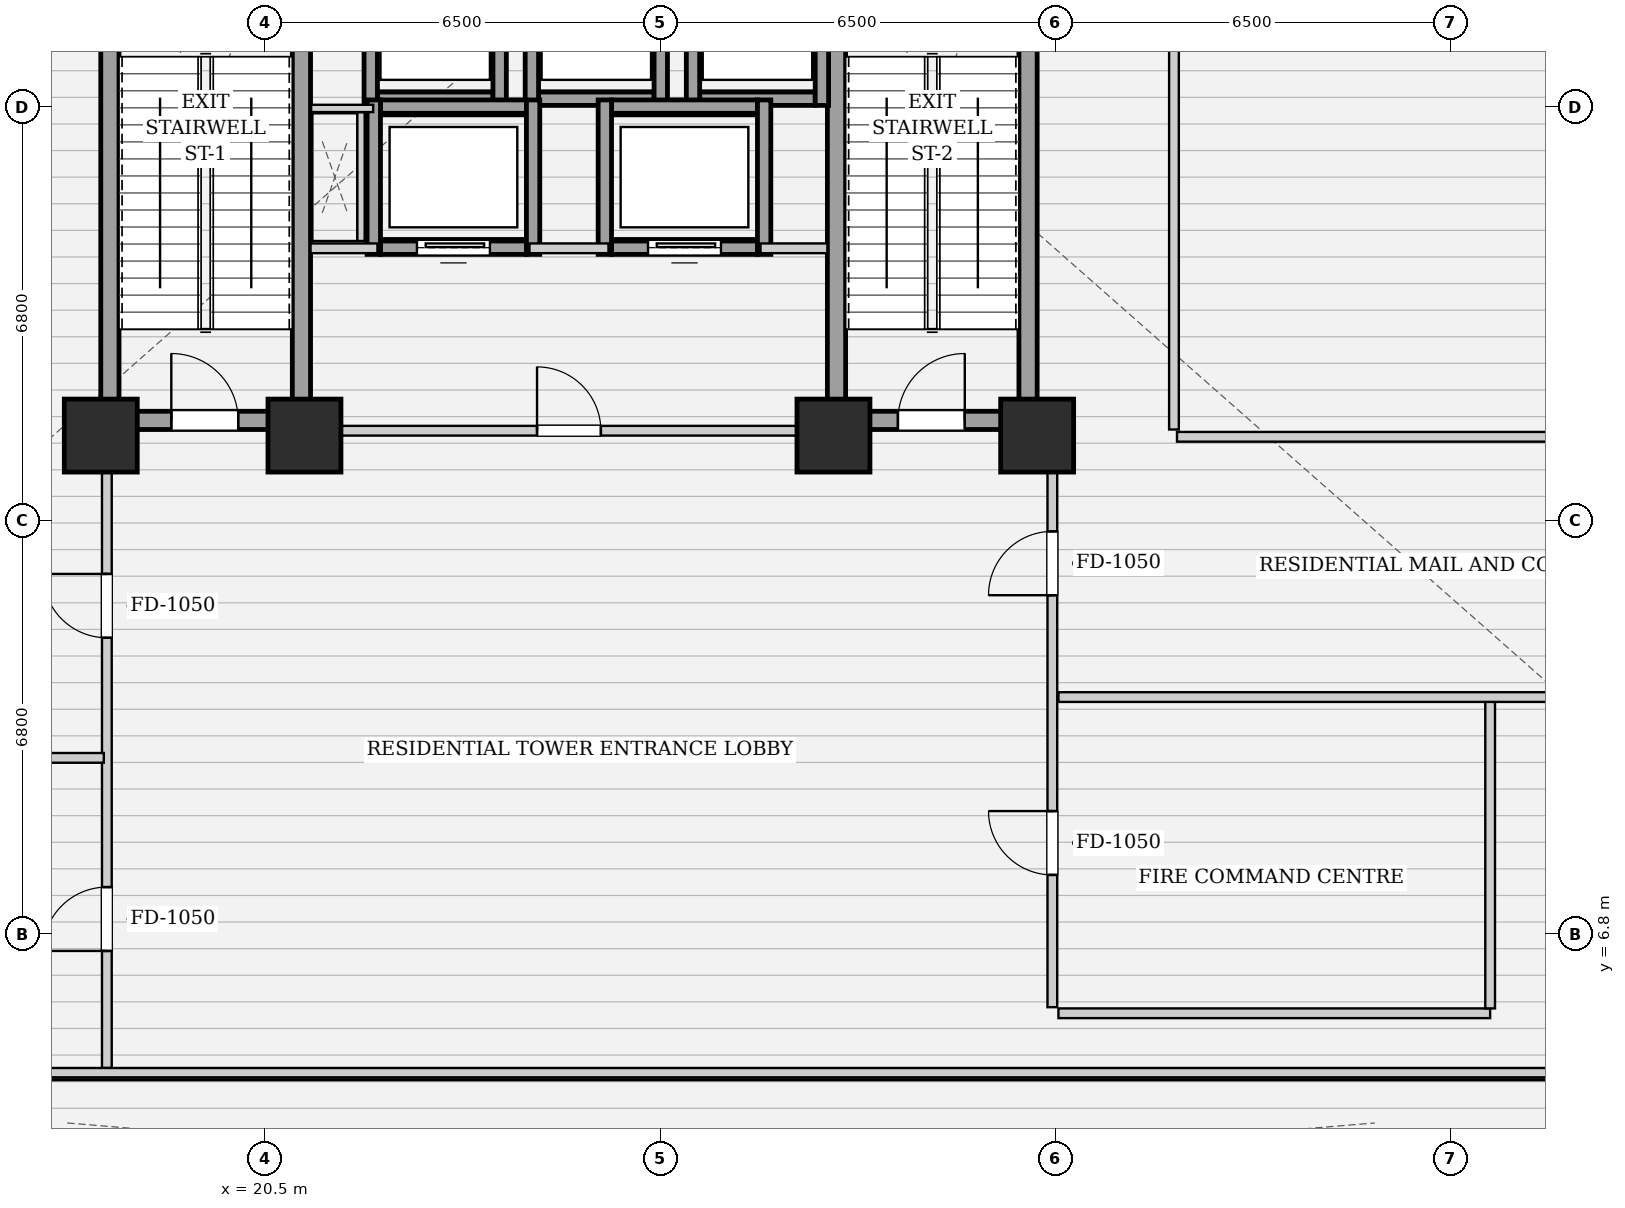
"""IFC4 building model, lengths in metres.
Left out: names, types, materials, properties, quantities, classifications, styles, units other than length and angle.
Written with IfcOpenShell. Run it as: python <this file> out.ifc"""

import sys

from ifc_helpers import new_model, si_unit, direction, frame, frame_2d, origin, origin_2d, place, context, subcontext, project, spatial, rectangle, extrude, element, fill, save


model = new_model("IFC4")
c1 = context("Model", 3, precision=1e-05, world=origin(), true_north=direction((0.0, 1.0)))
c2 = subcontext(c1, "Body", "Model", "MODEL_VIEW")
j1 = project(units=[si_unit("LENGTHUNIT", "METRE"), si_unit("PLANEANGLEUNIT", "RADIAN")], contexts=[c1])
p1 = place(None, origin())
s1 = spatial("IfcSite", under=j1, at=p1, CompositionType="ELEMENT")
p2 = place(p1, origin())
s2 = spatial("IfcBuilding", under=s1, at=p2, CompositionType="ELEMENT")
p3 = place(p2, origin())
s3 = spatial("IfcBuildingStorey", under=s2, at=p3, CompositionType="ELEMENT", Elevation=0.0)
for number, where, z_axis, x_axis in (
    (1, (17.8, 15.0, 0.0), (0.0, 0.0, 1.0), (1.0, 0.0, 0.0)),
    (2, (21.15, 15.0, 0.0), (0.0, 0.0, 1.0), (1.0, 0.0, 0.0)),
    (3, (29.85, 15.0, 0.0), (0.0, 0.0, 1.0), (1.0, 0.0, 0.0)),
    (4, (33.2, 15.0, 0.0), (0.0, 0.0, 1.0), (1.0, 0.0, 0.0)),
):
    element("IfcColumn", number, at=place(p3, frame(where, z_axis=z_axis, x_axis=x_axis)), inside=s3, PredefinedType="COLUMN", context=c2, shape_type="SweptSolid", body=[
        extrude(rectangle(XDim=1.2, YDim=1.2, at=origin_2d()), origin(), (0.0, 0.0, 1.0), 6.0),
    ])
for number, where, z_axis, x_axis in (
    (5, (17.95, 15.1, 0.0), (0.0, 0.0, 1.0), (0.0, 1.0, 0.0)),
    (6, (21.1, 15.1, 0.0), (0.0, 0.0, 1.0), (0.0, 1.0, 0.0)),
):
    element("IfcWall", number, at=place(p3, frame(where, z_axis=z_axis, x_axis=x_axis)), inside=s3, PredefinedType="SHEAR", context=c2, shape_type="SweptSolid", body=[
        extrude(rectangle(XDim=9.0, YDim=0.3, at=frame_2d((4.5, 0.0))), origin(), (0.0, 0.0, 1.0), 5.68),
    ])
p4 = place(p3, frame((18.1, 15.25, 0.0), z_axis=(0.0, 0.0, 1.0), x_axis=(1.0, 0.0, 0.0)))
e7 = element("IfcWall", 7, at=p4, inside=s3, PredefinedType="SHEAR", context=c2, shape_type="SweptSolid", body=[
    extrude(rectangle(XDim=2.85, YDim=0.3, at=frame_2d((1.425, 0.0))), origin(), (0.0, 0.0, 1.0), 5.68),
])
p5 = place(p4, frame((0.86, 0.0, 0.0)))
e8 = element("IfcOpeningElement", 8, at=p5, cuts=e7, PredefinedType="OPENING", context=c2, shape_type="SweptSolid", body=[
    extrude(rectangle(XDim=1.1, YDim=2.05, at=frame_2d((0.55, 1.025))), frame((0.0, 0.16, 0.0), z_axis=(0.0, -1.0, 0.0), x_axis=(1.0, 0.0, 0.0)), (0.0, 0.0, 1.0), 0.32),
])
for number, where, z_axis, x_axis in (
    (9, (29.9, 15.1, 0.0), (0.0, 0.0, 1.0), (0.0, 1.0, 0.0)),
    (10, (33.05, 15.1, 0.0), (0.0, 0.0, 1.0), (0.0, 1.0, 0.0)),
):
    element("IfcWall", number, at=place(p3, frame(where, z_axis=z_axis, x_axis=x_axis)), inside=s3, PredefinedType="SHEAR", context=c2, shape_type="SweptSolid", body=[
        extrude(rectangle(XDim=9.0, YDim=0.3, at=frame_2d((4.5, 0.0))), origin(), (0.0, 0.0, 1.0), 5.68),
    ])
p6 = place(p3, frame((30.05, 15.25, 0.0), z_axis=(0.0, 0.0, 1.0), x_axis=(1.0, 0.0, 0.0)))
e11 = element("IfcWall", 11, at=p6, inside=s3, PredefinedType="SHEAR", context=c2, shape_type="SweptSolid", body=[
    extrude(rectangle(XDim=2.85, YDim=0.3, at=frame_2d((1.425, 0.0))), origin(), (0.0, 0.0, 1.0), 5.68),
])
p7 = place(p6, frame((0.86, 0.0, 0.0)))
e12 = element("IfcOpeningElement", 12, at=p7, cuts=e11, PredefinedType="OPENING", context=c2, shape_type="SweptSolid", body=[
    extrude(rectangle(XDim=1.1, YDim=2.05, at=frame_2d((0.55, 1.025))), frame((0.0, 0.16, 0.0), z_axis=(0.0, -1.0, 0.0), x_axis=(1.0, 0.0, 0.0)), (0.0, 0.0, 1.0), 0.32),
])
p8 = place(p3, frame((22.35, 20.54, 0.0), z_axis=(0.0, 0.0, 1.0), x_axis=(1.0, 0.0, 0.0)))
e13 = element("IfcWall", 13, at=p8, inside=s3, PredefinedType="SHEAR", context=c2, shape_type="SweptSolid", body=[
    extrude(rectangle(XDim=1.9, YDim=0.22, at=frame_2d((0.95, 0.0))), origin(), (0.0, 0.0, 1.0), 5.68),
])
for number, where, z_axis, x_axis in (
    (14, (22.24, 20.43, 0.0), (0.0, 0.0, 1.0), (0.0, 1.0, 0.0)),
    (15, (24.36, 20.43, 0.0), (0.0, 0.0, 1.0), (0.0, 1.0, 0.0)),
):
    element("IfcWall", number, at=place(p3, frame(where, z_axis=z_axis, x_axis=x_axis)), inside=s3, PredefinedType="SHEAR", context=c2, shape_type="SweptSolid", body=[
        extrude(rectangle(XDim=2.44, YDim=0.22, at=frame_2d((1.22, 0.0))), origin(), (0.0, 0.0, 1.0), 5.68),
    ])
p9 = place(p3, frame((25.0, 20.54, 0.0), z_axis=(0.0, 0.0, 1.0), x_axis=(1.0, 0.0, 0.0)))
e16 = element("IfcWall", 16, at=p9, inside=s3, PredefinedType="SHEAR", context=c2, shape_type="SweptSolid", body=[
    extrude(rectangle(XDim=1.9, YDim=0.22, at=frame_2d((0.95, 0.0))), origin(), (0.0, 0.0, 1.0), 5.68),
])
for number, where, z_axis, x_axis in (
    (17, (24.89, 20.43, 0.0), (0.0, 0.0, 1.0), (0.0, 1.0, 0.0)),
    (18, (27.01, 20.43, 0.0), (0.0, 0.0, 1.0), (0.0, 1.0, 0.0)),
):
    element("IfcWall", number, at=place(p3, frame(where, z_axis=z_axis, x_axis=x_axis)), inside=s3, PredefinedType="SHEAR", context=c2, shape_type="SweptSolid", body=[
        extrude(rectangle(XDim=2.44, YDim=0.22, at=frame_2d((1.22, 0.0))), origin(), (0.0, 0.0, 1.0), 5.68),
    ])
p10 = place(p3, frame((27.65, 20.54, 0.0), z_axis=(0.0, 0.0, 1.0), x_axis=(1.0, 0.0, 0.0)))
e19 = element("IfcWall", 19, at=p10, inside=s3, PredefinedType="SHEAR", context=c2, shape_type="SweptSolid", body=[
    extrude(rectangle(XDim=1.9, YDim=0.22, at=frame_2d((0.95, 0.0))), origin(), (0.0, 0.0, 1.0), 5.68),
])
for number, where, z_axis, x_axis in (
    (20, (27.54, 20.43, 0.0), (0.0, 0.0, 1.0), (0.0, 1.0, 0.0)),
    (21, (29.66, 20.43, 0.0), (0.0, 0.0, 1.0), (0.0, 1.0, 0.0)),
):
    element("IfcWall", number, at=place(p3, frame(where, z_axis=z_axis, x_axis=x_axis)), inside=s3, PredefinedType="SHEAR", context=c2, shape_type="SweptSolid", body=[
        extrude(rectangle(XDim=2.44, YDim=0.22, at=frame_2d((1.22, 0.0))), origin(), (0.0, 0.0, 1.0), 5.68),
    ])
p11 = place(p3, frame((22.4, 18.09, 0.0), z_axis=(0.0, 0.0, 1.0), x_axis=(1.0, 0.0, 0.0)))
e22 = element("IfcWall", 22, at=p11, inside=s3, PredefinedType="SHEAR", context=c2, shape_type="SweptSolid", body=[
    extrude(rectangle(XDim=2.4, YDim=0.22, at=frame_2d((1.2, 0.0))), origin(), (0.0, 0.0, 1.0), 5.68),
])
p12 = place(p11, frame((0.6, 0.0, 0.0)))
e23 = element("IfcOpeningElement", 23, at=p12, cuts=e22, PredefinedType="OPENING", context=c2, shape_type="SweptSolid", body=[
    extrude(rectangle(XDim=1.2, YDim=2.15, at=frame_2d((0.6, 1.075))), frame((0.0, 0.12, 0.0), z_axis=(0.0, -1.0, 0.0), x_axis=(1.0, 0.0, 0.0)), (0.0, 0.0, 1.0), 0.24),
])
p13 = place(p3, frame((22.4, 20.41, 0.0), z_axis=(0.0, 0.0, 1.0), x_axis=(1.0, 0.0, 0.0)))
e24 = element("IfcWall", 24, at=p13, inside=s3, PredefinedType="SHEAR", context=c2, shape_type="SweptSolid", body=[
    extrude(rectangle(XDim=2.4, YDim=0.22, at=frame_2d((1.2, 0.0))), origin(), (0.0, 0.0, 1.0), 5.68),
])
for number, where, z_axis, x_axis in (
    (25, (22.29, 17.98, 0.0), (0.0, 0.0, 1.0), (0.0, 1.0, 0.0)),
    (26, (24.91, 17.98, 0.0), (0.0, 0.0, 1.0), (0.0, 1.0, 0.0)),
):
    element("IfcWall", number, at=place(p3, frame(where, z_axis=z_axis, x_axis=x_axis)), inside=s3, PredefinedType="SHEAR", context=c2, shape_type="SweptSolid", body=[
        extrude(rectangle(XDim=2.54, YDim=0.22, at=frame_2d((1.27, 0.0))), origin(), (0.0, 0.0, 1.0), 5.68),
    ])
p14 = place(p3, frame((26.2, 18.09, 0.0), z_axis=(0.0, 0.0, 1.0), x_axis=(1.0, 0.0, 0.0)))
e27 = element("IfcWall", 27, at=p14, inside=s3, PredefinedType="SHEAR", context=c2, shape_type="SweptSolid", body=[
    extrude(rectangle(XDim=2.4, YDim=0.22, at=frame_2d((1.2, 0.0))), origin(), (0.0, 0.0, 1.0), 5.68),
])
p15 = place(p14, frame((0.6, 0.0, 0.0)))
e28 = element("IfcOpeningElement", 28, at=p15, cuts=e27, PredefinedType="OPENING", context=c2, shape_type="SweptSolid", body=[
    extrude(rectangle(XDim=1.2, YDim=2.15, at=frame_2d((0.6, 1.075))), frame((0.0, 0.12, 0.0), z_axis=(0.0, -1.0, 0.0), x_axis=(1.0, 0.0, 0.0)), (0.0, 0.0, 1.0), 0.24),
])
p16 = place(p3, frame((26.2, 20.41, 0.0), z_axis=(0.0, 0.0, 1.0), x_axis=(1.0, 0.0, 0.0)))
e29 = element("IfcWall", 29, at=p16, inside=s3, PredefinedType="SHEAR", context=c2, shape_type="SweptSolid", body=[
    extrude(rectangle(XDim=2.4, YDim=0.22, at=frame_2d((1.2, 0.0))), origin(), (0.0, 0.0, 1.0), 5.68),
])
for number, where, z_axis, x_axis in (
    (30, (26.09, 17.98, 0.0), (0.0, 0.0, 1.0), (0.0, 1.0, 0.0)),
    (31, (28.71, 17.98, 0.0), (0.0, 0.0, 1.0), (0.0, 1.0, 0.0)),
):
    element("IfcWall", number, at=place(p3, frame(where, z_axis=z_axis, x_axis=x_axis)), inside=s3, PredefinedType="SHEAR", context=c2, shape_type="SweptSolid", body=[
        extrude(rectangle(XDim=2.54, YDim=0.22, at=frame_2d((1.27, 0.0))), origin(), (0.0, 0.0, 1.0), 5.68),
    ])
p17 = place(p3, frame((21.25, 15.08, 0.0), z_axis=(0.0, 0.0, 1.0), x_axis=(1.0, 0.0, 0.0)))
e32 = element("IfcWall", 32, at=p17, inside=s3, PredefinedType="PARTITIONING", context=c2, shape_type="SweptSolid", body=[
    extrude(rectangle(XDim=8.5, YDim=0.16, at=frame_2d((4.25, 0.0))), origin(), (0.0, 0.0, 1.0), 5.68),
])
p18 = place(p17, frame((3.725, 0.0, 0.0)))
e33 = element("IfcOpeningElement", 33, at=p18, cuts=e32, PredefinedType="OPENING", context=c2, shape_type="SweptSolid", body=[
    extrude(rectangle(XDim=1.05, YDim=2.05, at=frame_2d((0.525, 1.025))), frame((0.0, 0.09, 0.0), z_axis=(0.0, -1.0, 0.0), x_axis=(1.0, 0.0, 0.0)), (0.0, 0.0, 1.0), 0.18),
])
p19 = place(p3, frame((21.25, 18.08, 0.0), z_axis=(0.0, 0.0, 1.0), x_axis=(1.0, 0.0, 0.0)))
e34 = element("IfcWall", 34, at=p19, inside=s3, PredefinedType="PARTITIONING", context=c2, shape_type="SweptSolid", body=[
    extrude(rectangle(XDim=1.1, YDim=0.16, at=frame_2d((0.55, 0.0))), origin(), (0.0, 0.0, 1.0), 5.68),
])
p20 = place(p3, frame((24.85, 18.08, 0.0), z_axis=(0.0, 0.0, 1.0), x_axis=(1.0, 0.0, 0.0)))
e35 = element("IfcWall", 35, at=p20, inside=s3, PredefinedType="PARTITIONING", context=c2, shape_type="SweptSolid", body=[
    extrude(rectangle(XDim=1.3, YDim=0.16, at=frame_2d((0.65, 0.0))), origin(), (0.0, 0.0, 1.0), 5.68),
])
p21 = place(p3, frame((28.65, 18.08, 0.0), z_axis=(0.0, 0.0, 1.0), x_axis=(1.0, 0.0, 0.0)))
e36 = element("IfcWall", 36, at=p21, inside=s3, PredefinedType="PARTITIONING", context=c2, shape_type="SweptSolid", body=[
    extrude(rectangle(XDim=1.1, YDim=0.16, at=frame_2d((0.55, 0.0))), origin(), (0.0, 0.0, 1.0), 5.68),
])
p22 = place(p3, frame((22.08, 18.2, 0.0), z_axis=(0.0, 0.0, 1.0), x_axis=(0.0, 1.0, 0.0)))
e37 = element("IfcWall", 37, at=p22, inside=s3, PredefinedType="PARTITIONING", context=c2, shape_type="SweptSolid", body=[
    extrude(rectangle(XDim=2.12, YDim=0.12, at=frame_2d((1.06, 0.0))), origin(), (0.0, 0.0, 1.0), 5.68),
])
p23 = place(p3, frame((22.28, 20.38, 0.0), z_axis=(0.0, 0.0, 1.0), x_axis=(-1.0, 0.0, 0.0)))
e38 = element("IfcWall", 38, at=p23, inside=s3, PredefinedType="PARTITIONING", context=c2, shape_type="SweptSolid", body=[
    extrude(rectangle(XDim=1.02, YDim=0.12, at=frame_2d((0.51, 0.0))), origin(), (0.0, 0.0, 1.0), 5.68),
])
p24 = place(p3, frame((17.9, 4.6, 0.0), z_axis=(0.0, 0.0, 1.0), x_axis=(0.0, 1.0, 0.0)))
e39 = element("IfcWall", 39, at=p24, inside=s3, PredefinedType="PARTITIONING", context=c2, shape_type="SweptSolid", body=[
    extrude(rectangle(XDim=10.38, YDim=0.16, at=frame_2d((5.19, 0.0))), origin(), (0.0, 0.0, 1.0), 4.565),
])
p25 = place(p24, frame((1.925, 0.0, 0.0)))
e40 = element("IfcOpeningElement", 40, at=p25, cuts=e39, PredefinedType="OPENING", context=c2, shape_type="SweptSolid", body=[
    extrude(rectangle(XDim=1.05, YDim=2.05, at=frame_2d((0.525, 1.025))), frame((0.0, 0.09, 0.0), z_axis=(0.0, -1.0, 0.0), x_axis=(1.0, 0.0, 0.0)), (0.0, 0.0, 1.0), 0.18),
])
p26 = place(p24, frame((7.075, 0.0, 0.0)))
e41 = element("IfcOpeningElement", 41, at=p26, cuts=e39, PredefinedType="OPENING", context=c2, shape_type="SweptSolid", body=[
    extrude(rectangle(XDim=1.05, YDim=2.05, at=frame_2d((0.525, 1.025))), frame((0.0, 0.09, 0.0), z_axis=(0.0, -1.0, 0.0), x_axis=(1.0, 0.0, 0.0)), (0.0, 0.0, 1.0), 0.18),
])
p27 = place(p3, frame((33.45, 5.6, 0.0), z_axis=(0.0, 0.0, 1.0), x_axis=(0.0, 1.0, 0.0)))
e42 = element("IfcWall", 42, at=p27, inside=s3, PredefinedType="PARTITIONING", context=c2, shape_type="SweptSolid", body=[
    extrude(rectangle(XDim=9.3, YDim=0.16, at=frame_2d((4.65, 0.0))), origin(), (0.0, 0.0, 1.0), 5.68),
])
p28 = place(p27, frame((2.175, 0.0, 0.0)))
e43 = element("IfcOpeningElement", 43, at=p28, cuts=e42, PredefinedType="OPENING", context=c2, shape_type="SweptSolid", body=[
    extrude(rectangle(XDim=1.05, YDim=2.05, at=frame_2d((0.525, 1.025))), frame((0.0, 0.09, 0.0), z_axis=(0.0, -1.0, 0.0), x_axis=(1.0, 0.0, 0.0)), (0.0, 0.0, 1.0), 0.18),
])
p29 = place(p27, frame((6.775, 0.0, 0.0)))
e44 = element("IfcOpeningElement", 44, at=p29, cuts=e42, PredefinedType="OPENING", context=c2, shape_type="SweptSolid", body=[
    extrude(rectangle(XDim=1.05, YDim=2.05, at=frame_2d((0.525, 1.025))), frame((0.0, 0.09, 0.0), z_axis=(0.0, -1.0, 0.0), x_axis=(1.0, 0.0, 0.0)), (0.0, 0.0, 1.0), 0.18),
])
p30 = place(p3, frame((33.55, 5.5, 0.0), z_axis=(0.0, 0.0, 1.0), x_axis=(1.0, 0.0, 0.0)))
e45 = element("IfcWall", 45, at=p30, inside=s3, PredefinedType="PARTITIONING", context=c2, shape_type="SweptSolid", body=[
    extrude(rectangle(XDim=7.1, YDim=0.16, at=frame_2d((3.55, 0.0))), origin(), (0.0, 0.0, 1.0), 5.68),
])
p31 = place(p3, frame((40.65, 5.58, 0.0), z_axis=(0.0, 0.0, 1.0), x_axis=(0.0, 1.0, 0.0)))
e46 = element("IfcWall", 46, at=p31, inside=s3, PredefinedType="PARTITIONING", context=c2, shape_type="SweptSolid", body=[
    extrude(rectangle(XDim=5.07, YDim=0.16, at=frame_2d((2.535, 0.0))), origin(), (0.0, 0.0, 1.0), 5.68),
])
p32 = place(p3, frame((33.55, 10.7, 0.0), z_axis=(0.0, 0.0, 1.0), x_axis=(1.0, 0.0, 0.0)))
e47 = element("IfcWall", 47, at=p32, inside=s3, PredefinedType="PARTITIONING", context=c2, shape_type="SweptSolid", body=[
    extrude(rectangle(XDim=14.05, YDim=0.16, at=frame_2d((7.025, 0.0))), origin(), (0.0, 0.0, 1.0), 5.68),
])
p33 = place(p3, frame((35.5, 14.98, 0.0), z_axis=(0.0, 0.0, 1.0), x_axis=(1.0, 0.0, 0.0)))
e48 = element("IfcWall", 48, at=p33, inside=s3, PredefinedType="PARTITIONING", context=c2, shape_type="SweptSolid", body=[
    extrude(rectangle(XDim=12.1, YDim=0.16, at=frame_2d((6.05, 0.0))), origin(), (0.0, 0.0, 1.0), 4.565),
])
p34 = place(p3, frame((6.4, 4.52, 0.0), z_axis=(0.0, 0.0, 1.0), x_axis=(1.0, 0.0, 0.0)))
e49 = element("IfcWall", 49, at=p34, inside=s3, PredefinedType="PARTITIONING", context=c2, shape_type="SweptSolid", body=[
    extrude(rectangle(XDim=40.9, YDim=0.16, at=frame_2d((20.45, 0.0))), origin(), (0.0, 0.0, 1.0), 5.68),
])
p35 = place(p3, frame((6.4, 9.7, 0.0), z_axis=(0.0, 0.0, 1.0), x_axis=(1.0, 0.0, 0.0)))
e50 = element("IfcWall", 50, at=p35, inside=s3, PredefinedType="PARTITIONING", context=c2, shape_type="SweptSolid", body=[
    extrude(rectangle(XDim=11.45, YDim=0.16, at=frame_2d((5.725, 0.0))), origin(), (0.0, 0.0, 1.0), 5.68),
])
p36 = place(p3, frame((35.45, 15.1, 0.0), z_axis=(0.0, 0.0, 1.0), x_axis=(0.0, 1.0, 0.0)))
e51 = element("IfcWall", 51, at=p36, inside=s3, PredefinedType="PARTITIONING", context=c2, shape_type="SweptSolid", body=[
    extrude(rectangle(XDim=13.78, YDim=0.16, at=frame_2d((6.89, 0.0))), origin(), (0.0, 0.0, 1.0), 5.68),
])
p37 = place(p36, frame((6.975, 0.0, 0.0)))
e52 = element("IfcOpeningElement", 52, at=p37, cuts=e51, PredefinedType="OPENING", context=c2, shape_type="SweptSolid", body=[
    extrude(rectangle(XDim=1.05, YDim=2.05, at=frame_2d((0.525, 1.025))), frame((0.0, 0.09, 0.0), z_axis=(0.0, -1.0, 0.0), x_axis=(1.0, 0.0, 0.0)), (0.0, 0.0, 1.0), 0.18),
])
p38 = place(p5, origin())
e53 = element("IfcDoor", 53, at=p38, inside=s3, OperationType="SINGLE_SWING_LEFT", PredefinedType="DOOR", context=c2, shape_type="SweptSolid", body=[
    extrude(rectangle(XDim=1.1, YDim=2.05, at=frame_2d((0.55, 1.025))), frame((0.0, 0.025, 0.0), z_axis=(0.0, -1.0, 0.0), x_axis=(1.0, 0.0, 0.0)), (0.0, 0.0, 1.0), 0.05),
])
fill(e8, e53)
p39 = place(p7, origin())
e54 = element("IfcDoor", 54, at=p39, inside=s3, OperationType="SINGLE_SWING_RIGHT", PredefinedType="DOOR", context=c2, shape_type="SweptSolid", body=[
    extrude(rectangle(XDim=1.1, YDim=2.05, at=frame_2d((0.55, 1.025))), frame((0.0, 0.025, 0.0), z_axis=(0.0, -1.0, 0.0), x_axis=(1.0, 0.0, 0.0)), (0.0, 0.0, 1.0), 0.05),
])
fill(e12, e54)
p40 = place(p12, origin())
e55 = element("IfcDoor", 55, at=p40, inside=s3, OperationType="SLIDING_TO_LEFT", PredefinedType="DOOR", context=c2, shape_type="SweptSolid", body=[
    extrude(rectangle(XDim=1.2, YDim=2.15, at=frame_2d((0.6, 1.075))), frame((0.0, 0.025, 0.0), z_axis=(0.0, -1.0, 0.0), x_axis=(1.0, 0.0, 0.0)), (0.0, 0.0, 1.0), 0.05),
])
fill(e23, e55)
p41 = place(p15, origin())
e56 = element("IfcDoor", 56, at=p41, inside=s3, OperationType="SLIDING_TO_LEFT", PredefinedType="DOOR", context=c2, shape_type="SweptSolid", body=[
    extrude(rectangle(XDim=1.2, YDim=2.15, at=frame_2d((0.6, 1.075))), frame((0.0, 0.025, 0.0), z_axis=(0.0, -1.0, 0.0), x_axis=(1.0, 0.0, 0.0)), (0.0, 0.0, 1.0), 0.05),
])
fill(e28, e56)
p42 = place(p18, origin())
e57 = element("IfcDoor", 57, at=p42, inside=s3, OperationType="SINGLE_SWING_LEFT", PredefinedType="DOOR", context=c2, shape_type="SweptSolid", body=[
    extrude(rectangle(XDim=1.05, YDim=2.05, at=frame_2d((0.525, 1.025))), frame((0.0, 0.025, 0.0), z_axis=(0.0, -1.0, 0.0), x_axis=(1.0, 0.0, 0.0)), (0.0, 0.0, 1.0), 0.05),
])
fill(e33, e57)
p43 = place(p25, origin())
e58 = element("IfcDoor", 58, at=p43, inside=s3, OperationType="SINGLE_SWING_LEFT", PredefinedType="DOOR", context=c2, shape_type="SweptSolid", body=[
    extrude(rectangle(XDim=1.05, YDim=2.05, at=frame_2d((0.525, 1.025))), frame((0.0, 0.025, 0.0), z_axis=(0.0, -1.0, 0.0), x_axis=(1.0, 0.0, 0.0)), (0.0, 0.0, 1.0), 0.05),
])
fill(e40, e58)
p44 = place(p26, origin())
e59 = element("IfcDoor", 59, at=p44, inside=s3, OperationType="SINGLE_SWING_RIGHT", PredefinedType="DOOR", context=c2, shape_type="SweptSolid", body=[
    extrude(rectangle(XDim=1.05, YDim=2.05, at=frame_2d((0.525, 1.025))), frame((0.0, 0.025, 0.0), z_axis=(0.0, -1.0, 0.0), x_axis=(1.0, 0.0, 0.0)), (0.0, 0.0, 1.0), 0.05),
])
fill(e41, e59)
p45 = place(p28, origin())
e60 = element("IfcDoor", 60, at=p45, inside=s3, OperationType="SINGLE_SWING_RIGHT", PredefinedType="DOOR", context=c2, shape_type="SweptSolid", body=[
    extrude(rectangle(XDim=1.05, YDim=2.05, at=frame_2d((0.525, 1.025))), frame((0.0, 0.025, 0.0), z_axis=(0.0, -1.0, 0.0), x_axis=(1.0, 0.0, 0.0)), (0.0, 0.0, 1.0), 0.05),
])
fill(e43, e60)
p46 = place(p29, origin())
e61 = element("IfcDoor", 61, at=p46, inside=s3, OperationType="SINGLE_SWING_LEFT", PredefinedType="DOOR", context=c2, shape_type="SweptSolid", body=[
    extrude(rectangle(XDim=1.05, YDim=2.05, at=frame_2d((0.525, 1.025))), frame((0.0, 0.025, 0.0), z_axis=(0.0, -1.0, 0.0), x_axis=(1.0, 0.0, 0.0)), (0.0, 0.0, 1.0), 0.05),
])
fill(e44, e61)
save(model, sys.argv[1])
